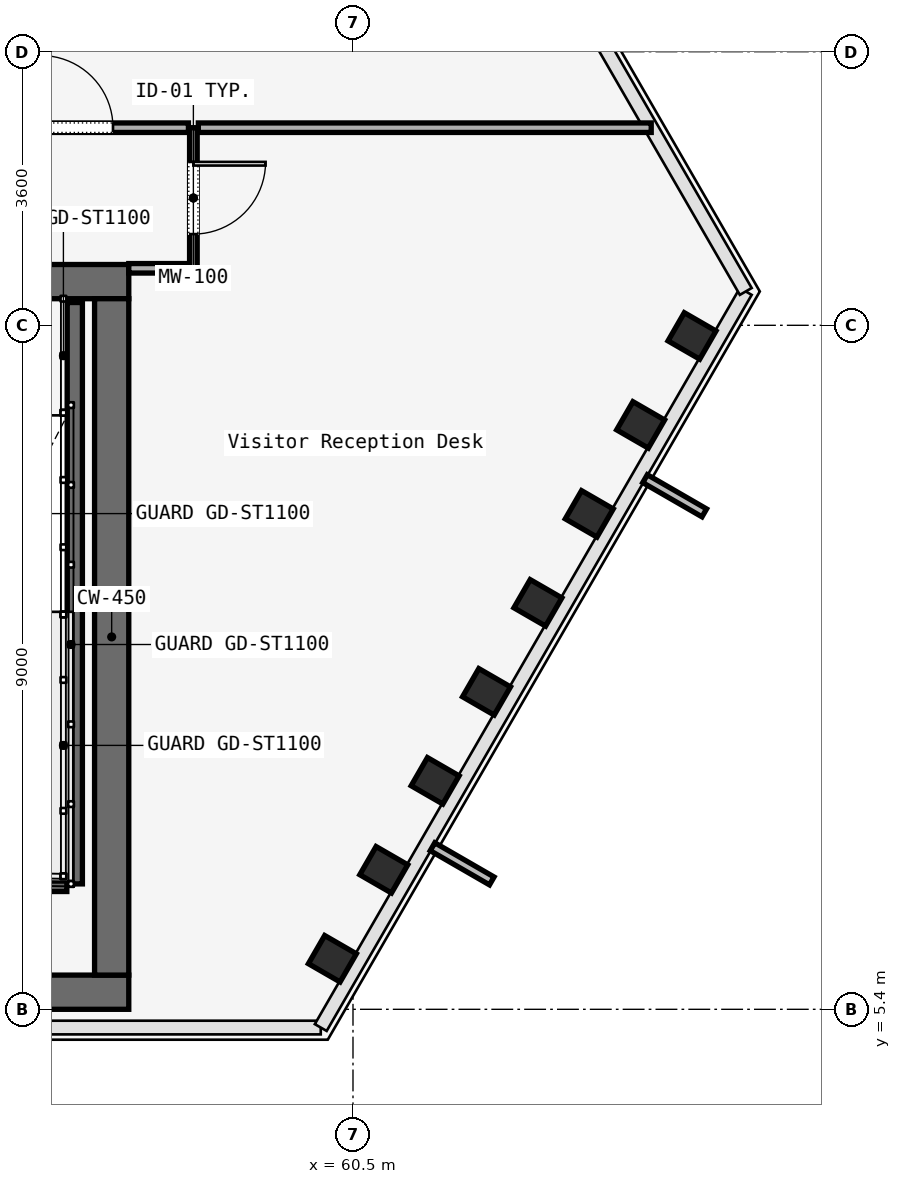
"""IFC4 building model, lengths in metres.
Left out: names, types, materials, properties, quantities, classifications, styles, units other than length and angle.
Written with IfcOpenShell. Run it as: python <this file> out.ifc"""

import sys

from ifc_helpers import new_model, si_unit, direction, frame, frame_2d, origin, origin_2d, place, context, subcontext, project, spatial, rectangle, i_section, extrude, element, fill, save


model = new_model("IFC4")
c1 = context("Model", 3, precision=1e-05, world=origin(), true_north=direction((0.0, 1.0)))
c2 = subcontext(c1, "Body", "Model", "MODEL_VIEW")
j1 = project(units=[si_unit("LENGTHUNIT", "METRE"), si_unit("PLANEANGLEUNIT", "RADIAN")], contexts=[c1])
p1 = place(None, origin())
s1 = spatial("IfcSite", under=j1, at=p1, CompositionType="ELEMENT")
p2 = place(p1, origin())
s2 = spatial("IfcBuilding", under=s1, at=p2, CompositionType="ELEMENT")
p3 = place(p2, frame((0.0, 0.0, 149.8)))
s3 = spatial("IfcBuildingStorey", under=s2, at=p3, CompositionType="ELEMENT", Elevation=149.8)
p4 = place(p3, frame((26.45, 14.975, 0.0), z_axis=(0.0, 0.0, 1.0), x_axis=(1.0, 0.0, 0.0)))
e1 = element("IfcWall", 1, at=p4, inside=s3, PredefinedType="SOLIDWALL", context=c2, shape_type="SweptSolid", body=[
    extrude(rectangle(XDim=31.1, YDim=0.45, at=frame_2d((15.55, 0.0))), origin(), (0.0, 0.0, 1.0), 3.58),
])
p5 = place(p4, frame((1.65, 0.0, 0.0)))
e2 = element("IfcOpeningElement", 2, at=p5, cuts=e1, PredefinedType="OPENING", context=c2, shape_type="SweptSolid", body=[
    extrude(rectangle(XDim=1.1, YDim=2.2, at=frame_2d((0.55, 1.1))), frame((0.0, 0.225, 0.0), z_axis=(0.0, -1.0, 0.0), x_axis=(1.0, 0.0, 0.0)), (0.0, 0.0, 1.0), 0.45),
])
p6 = place(p4, frame((13.65, 0.0, 0.0)))
e3 = element("IfcOpeningElement", 3, at=p6, cuts=e1, PredefinedType="OPENING", context=c2, shape_type="SweptSolid", body=[
    extrude(rectangle(XDim=1.1, YDim=2.2, at=frame_2d((0.55, 1.1))), frame((0.0, 0.225, 0.0), z_axis=(0.0, -1.0, 0.0), x_axis=(1.0, 0.0, 0.0)), (0.0, 0.0, 1.0), 0.45),
])
p7 = place(p4, frame((25.55, 0.0, 0.0)))
e4 = element("IfcOpeningElement", 4, at=p7, cuts=e1, PredefinedType="OPENING", context=c2, shape_type="SweptSolid", body=[
    extrude(rectangle(XDim=1.1, YDim=2.2, at=frame_2d((0.55, 1.1))), frame((0.0, 0.225, 0.0), z_axis=(0.0, -1.0, 0.0), x_axis=(1.0, 0.0, 0.0)), (0.0, 0.0, 1.0), 0.45),
])
p8 = place(p4, frame((10.7, 0.0, 0.0)))
e5 = element("IfcOpeningElement", 5, at=p8, cuts=e1, PredefinedType="OPENING", context=c2, shape_type="SweptSolid", body=[
    extrude(rectangle(XDim=1.4, YDim=2.2, at=frame_2d((0.7, 1.1))), frame((0.0, 0.225, 0.0), z_axis=(0.0, -1.0, 0.0), x_axis=(1.0, 0.0, 0.0)), (0.0, 0.0, 1.0), 0.45),
])
p9 = place(p4, frame((19.35, 0.0, 0.0)))
e6 = element("IfcOpeningElement", 6, at=p9, cuts=e1, PredefinedType="OPENING", context=c2, shape_type="SweptSolid", body=[
    extrude(rectangle(XDim=1.1, YDim=2.2, at=frame_2d((0.55, 1.1))), frame((0.0, 0.225, 0.0), z_axis=(0.0, -1.0, 0.0), x_axis=(1.0, 0.0, 0.0)), (0.0, 0.0, 1.0), 0.45),
])
p10 = place(p4, frame((21.4, 0.0, 0.0)))
e7 = element("IfcOpeningElement", 7, at=p10, cuts=e1, PredefinedType="OPENING", context=c2, shape_type="SweptSolid", body=[
    extrude(rectangle(XDim=0.9, YDim=2.1, at=frame_2d((0.45, 1.05))), frame((0.0, 0.225, 0.0), z_axis=(0.0, -1.0, 0.0), x_axis=(1.0, 0.0, 0.0)), (0.0, 0.0, 1.0), 0.45),
])
p11 = place(p4, frame((23.35, 0.0, 0.0)))
e8 = element("IfcOpeningElement", 8, at=p11, cuts=e1, PredefinedType="OPENING", context=c2, shape_type="SweptSolid", body=[
    extrude(rectangle(XDim=1.3, YDim=2.3, at=frame_2d((0.65, 1.15))), frame((0.0, 0.225, 0.0), z_axis=(0.0, -1.0, 0.0), x_axis=(1.0, 0.0, 0.0)), (0.0, 0.0, 1.0), 0.45),
])
p12 = place(p3, frame((26.45, 5.625, 0.0), z_axis=(0.0, 0.0, 1.0), x_axis=(1.0, 0.0, 0.0)))
e9 = element("IfcWall", 9, at=p12, inside=s3, PredefinedType="SOLIDWALL", context=c2, shape_type="SweptSolid", body=[
    extrude(rectangle(XDim=31.1, YDim=0.45, at=frame_2d((15.55, 0.0))), origin(), (0.0, 0.0, 1.0), 3.58),
])
p13 = place(p3, frame((57.325, 5.85, 0.0), z_axis=(0.0, 0.0, 1.0), x_axis=(0.0, 1.0, 0.0)))
e10 = element("IfcWall", 10, at=p13, inside=s3, PredefinedType="SOLIDWALL", context=c2, shape_type="SweptSolid", body=[
    extrude(rectangle(XDim=8.9, YDim=0.45, at=frame_2d((4.45, 0.0))), origin(), (0.0, 0.0, 1.0), 3.58),
])
for number, where, z_axis, x_axis in (
    (11, (60.229, 6.065, 0.0), (0.0, 0.0, 1.0), (0.5, 0.866, 0.0)),
    (12, (60.905, 7.236, 0.0), (0.0, 0.0, 1.0), (0.5, 0.866, 0.0)),
    (13, (61.581, 8.407, 0.0), (0.0, 0.0, 1.0), (0.5, 0.866, 0.0)),
    (14, (62.257, 9.577, 0.0), (0.0, 0.0, 1.0), (0.5, 0.866, 0.0)),
    (15, (62.933, 10.748, 0.0), (0.0, 0.0, 1.0), (0.5, 0.866, 0.0)),
    (16, (63.608, 11.919, 0.0), (0.0, 0.0, 1.0), (0.5, 0.866, 0.0)),
    (17, (64.284, 13.089, 0.0), (0.0, 0.0, 1.0), (0.5, 0.866, 0.0)),
    (18, (64.96, 14.26, 0.0), (0.0, 0.0, 1.0), (0.5, 0.866, 0.0)),
):
    element("IfcColumn", number, at=place(p3, frame(where, z_axis=z_axis, x_axis=x_axis)), inside=s3, PredefinedType="COLUMN", context=c2, shape_type="SweptSolid", body=[
        extrude(i_section(OverallWidth=0.428, OverallDepth=0.481, WebThickness=0.051, FlangeThickness=0.065, FilletRadius=0.015, at=origin_2d()), origin(), (0.0, 0.0, 1.0), 3.58),
    ])
p14 = place(p3, frame((56.84, 14.7, 0.0), z_axis=(0.0, 0.0, 1.0), x_axis=(0.0, -1.0, 0.0)))
e19 = element("IfcWall", 19, at=p14, inside=s3, PredefinedType="SOLIDWALL", context=c2, shape_type="SweptSolid", body=[
    extrude(rectangle(XDim=7.65, YDim=0.2, at=frame_2d((3.825, 0.0))), origin(), (0.0, 0.0, 1.0), 3.8),
])
p15 = place(p3, frame((53.62, 7.05, 0.0), z_axis=(0.0, 0.0, 1.0), x_axis=(1.0, 0.0, 0.0)))
e20 = element("IfcWall", 20, at=p15, inside=s3, PredefinedType="SOLIDWALL", context=c2, shape_type="SweptSolid", body=[
    extrude(rectangle(XDim=3.115, YDim=0.2, at=frame_2d((1.558, 0.0))), origin(), (0.0, 0.0, 1.0), 3.8),
])
p16 = place(p3, frame((58.4, 17.0, 0.0), z_axis=(0.0, 0.0, 1.0), x_axis=(0.0, -1.0, 0.0)))
e21 = element("IfcWall", 21, at=p16, inside=s3, PredefinedType="MOVABLE", context=c2, shape_type="SweptSolid", body=[
    extrude(rectangle(XDim=1.85, YDim=0.1, at=frame_2d((0.925, 0.0))), origin(), (0.0, 0.0, 1.0), 3.01),
])
p17 = place(p16, frame((0.45, 0.0, 0.0)))
e22 = element("IfcOpeningElement", 22, at=p17, cuts=e21, PredefinedType="OPENING", context=c2, shape_type="SweptSolid", body=[
    extrude(rectangle(XDim=0.95, YDim=2.2, at=frame_2d((0.475, 1.1))), frame((0.0, 0.05, 0.0), z_axis=(0.0, -1.0, 0.0), x_axis=(1.0, 0.0, 0.0)), (0.0, 0.0, 1.0), 0.1),
])
p18 = place(p3, frame((58.335, 15.15, 0.0), z_axis=(0.0, 0.0, 1.0), x_axis=(-1.0, 0.0, 0.0)))
e23 = element("IfcWall", 23, at=p18, inside=s3, PredefinedType="PARTITIONING", context=c2, shape_type="SweptSolid", body=[
    extrude(rectangle(XDim=0.785, YDim=0.125, at=frame_2d((0.393, 0.0))), origin(), (0.0, 0.0, 1.0), 3.01),
])
p19 = place(p3, frame((55.4, 17.0, 0.0), z_axis=(0.0, 0.0, 1.0), x_axis=(1.0, 0.0, 0.0)))
e24 = element("IfcWall", 24, at=p19, inside=s3, PredefinedType="PARTITIONING", context=c2, shape_type="SweptSolid", body=[
    extrude(rectangle(XDim=2.935, YDim=0.125, at=frame_2d((1.468, 0.0))), origin(), (0.0, 0.0, 1.0), 3.01),
])
p20 = place(p19, frame((0.992, 0.0, 0.0)))
e25 = element("IfcOpeningElement", 25, at=p20, cuts=e24, PredefinedType="OPENING", context=c2, shape_type="SweptSolid", body=[
    extrude(rectangle(XDim=0.95, YDim=2.2, at=frame_2d((0.475, 1.1))), frame((0.0, 0.062, 0.0), z_axis=(0.0, -1.0, 0.0), x_axis=(1.0, 0.0, 0.0)), (0.0, 0.0, 1.0), 0.125),
])
p21 = place(p3, frame((58.465, 17.0, 0.0), z_axis=(0.0, 0.0, 1.0), x_axis=(1.0, 0.0, 0.0)))
e26 = element("IfcWall", 26, at=p21, inside=s3, PredefinedType="PARTITIONING", context=c2, shape_type="SweptSolid", body=[
    extrude(rectangle(XDim=5.959, YDim=0.125, at=frame_2d((2.979, 0.0))), origin(), (0.0, 0.0, 1.0), 3.01),
])
p22 = place(p17, origin())
e27 = element("IfcDoor", 27, at=p22, inside=s3, OperationType="SINGLE_SWING_LEFT", PredefinedType="DOOR", context=c2, shape_type="SweptSolid", body=[
    extrude(rectangle(XDim=0.95, YDim=2.2, at=frame_2d((0.475, 1.1))), frame((0.0, 0.025, 0.0), z_axis=(0.0, -1.0, 0.0), x_axis=(1.0, 0.0, 0.0)), (0.0, 0.0, 1.0), 0.05),
])
fill(e22, e27)
p23 = place(p20, origin())
e28 = element("IfcDoor", 28, at=p23, inside=s3, OperationType="SINGLE_SWING_LEFT", PredefinedType="DOOR", context=c2, shape_type="SweptSolid", body=[
    extrude(rectangle(XDim=0.95, YDim=2.2, at=frame_2d((0.475, 1.1))), frame((0.0, 0.025, 0.0), z_axis=(0.0, -1.0, 0.0), x_axis=(1.0, 0.0, 0.0)), (0.0, 0.0, 1.0), 0.05),
])
fill(e25, e28)
save(model, sys.argv[1])
